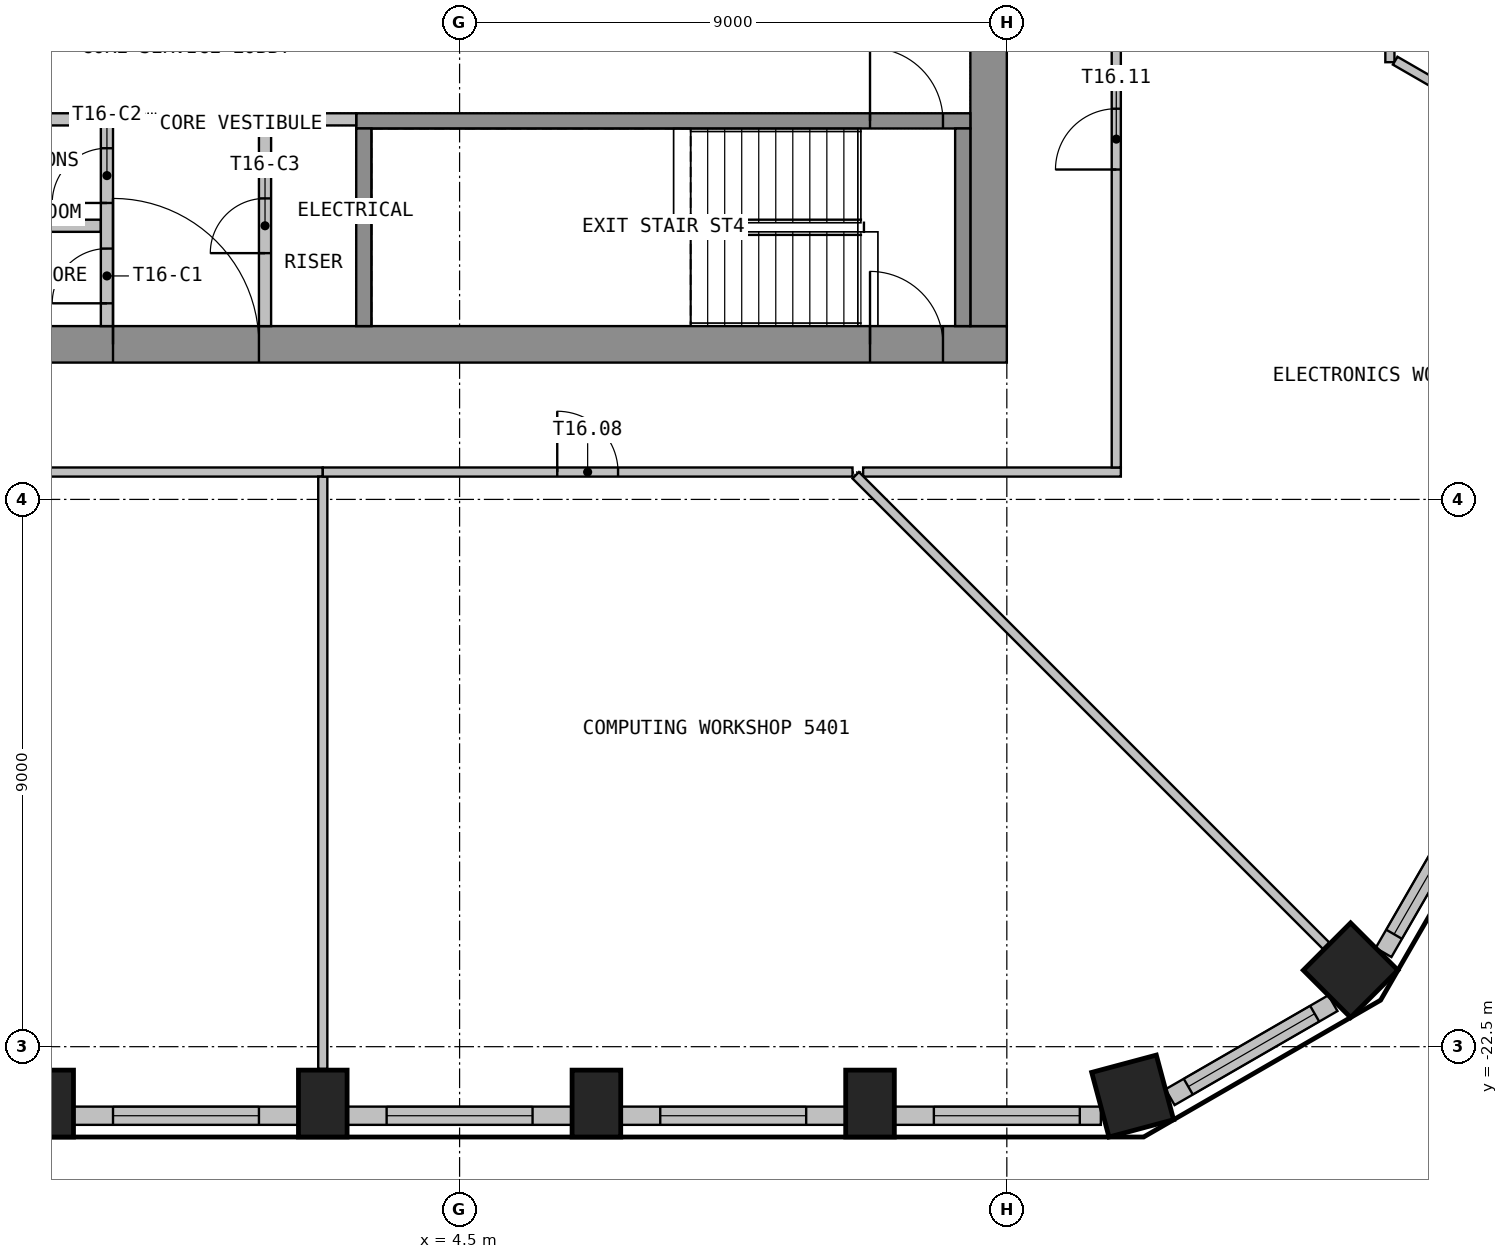
"""IFC4 building model, lengths in metres.
Left out: names, types, materials, properties, quantities, classifications, styles, units other than length and angle.
Written with IfcOpenShell. Run it as: python <this file> out.ifc"""

import sys

from ifc_helpers import new_model, si_unit, direction, frame, frame_2d, origin, origin_2d, place, context, subcontext, project, spatial, rectangle, extrude, element, fill, save


model = new_model("IFC4")
c1 = context("Model", 3, precision=1e-05, world=origin(), true_north=direction((0.0, 1.0)))
c2 = subcontext(c1, "Body", "Model", "MODEL_VIEW")
j1 = project(units=[si_unit("LENGTHUNIT", "METRE"), si_unit("PLANEANGLEUNIT", "RADIAN")], contexts=[c1])
p1 = place(None, origin())
s1 = spatial("IfcSite", under=j1, at=p1, CompositionType="ELEMENT")
p2 = place(p1, origin())
s2 = spatial("IfcBuilding", under=s1, at=p2, CompositionType="ELEMENT")
p3 = place(p2, frame((0.0, 0.0, 219.0)))
s3 = spatial("IfcBuildingStorey", under=s2, at=p3, CompositionType="ELEMENT", Elevation=219.0)
for number, where, z_axis, x_axis in (
    (1, (-2.25, -23.436, 0.0), (0.0, 0.0, 1.0), (1.0, 0.0, 0.0)),
    (2, (2.25, -23.436, 0.0), (0.0, 0.0, 1.0), (1.0, 0.0, 0.0)),
    (3, (6.75, -23.436, 0.0), (0.0, 0.0, 1.0), (1.0, 0.0, 0.0)),
    (4, (11.25, -23.436, 0.0), (0.0, 0.0, 1.0), (1.0, 0.0, 0.0)),
):
    element("IfcColumn", number, at=place(p3, frame(where, z_axis=z_axis, x_axis=x_axis)), inside=s3, PredefinedType="COLUMN", context=c2, shape_type="SweptSolid", body=[
        extrude(rectangle(XDim=0.8, YDim=1.1, at=origin_2d()), origin(), (0.0, 0.0, 1.0), 3.55),
    ])
for number, where, z_axis, x_axis in (
    (5, (15.57, -23.312, 0.0), (0.0, 0.0, 1.0), (0.966, 0.259, 0.0)),
    (6, (19.154, -21.242, 0.0), (0.0, 0.0, 1.0), (0.707, 0.707, 0.0)),
):
    element("IfcColumn", number, at=place(p3, frame(where, z_axis=z_axis, x_axis=x_axis)), inside=s3, PredefinedType="COLUMN", context=c2, shape_type="SweptSolid", body=[
        extrude(rectangle(XDim=1.1, YDim=1.1, at=origin_2d()), origin(), (0.0, 0.0, 1.0), 3.55),
    ])
p4 = place(p3, frame((-1.85, -23.635, 0.0), z_axis=(0.0, 0.0, 1.0), x_axis=(1.0, 0.0, 0.0)))
e7 = element("IfcWall", 7, at=p4, inside=s3, PredefinedType="SOLIDWALL", context=c2, shape_type="SweptSolid", body=[
    extrude(rectangle(XDim=3.699, YDim=0.3, at=frame_2d((1.85, 0.0))), origin(), (0.0, 0.0, 1.0), 3.55),
])
p5 = place(p4, frame((0.649, 0.0, 0.9)))
e8 = element("IfcOpeningElement", 8, at=p5, cuts=e7, PredefinedType="OPENING", context=c2, shape_type="SweptSolid", body=[
    extrude(rectangle(XDim=2.4, YDim=2.1, at=frame_2d((1.2, 1.05))), frame((0.0, 0.16, 0.0), z_axis=(0.0, -1.0, 0.0), x_axis=(1.0, 0.0, 0.0)), (0.0, 0.0, 1.0), 0.32),
])
p6 = place(p3, frame((2.65, -23.635, 0.0), z_axis=(0.0, 0.0, 1.0), x_axis=(1.0, 0.0, 0.0)))
e9 = element("IfcWall", 9, at=p6, inside=s3, PredefinedType="SOLIDWALL", context=c2, shape_type="SweptSolid", body=[
    extrude(rectangle(XDim=3.699, YDim=0.3, at=frame_2d((1.85, 0.0))), origin(), (0.0, 0.0, 1.0), 3.55),
])
p7 = place(p6, frame((0.649, 0.0, 0.9)))
e10 = element("IfcOpeningElement", 10, at=p7, cuts=e9, PredefinedType="OPENING", context=c2, shape_type="SweptSolid", body=[
    extrude(rectangle(XDim=2.4, YDim=2.1, at=frame_2d((1.2, 1.05))), frame((0.0, 0.16, 0.0), z_axis=(0.0, -1.0, 0.0), x_axis=(1.0, 0.0, 0.0)), (0.0, 0.0, 1.0), 0.32),
])
p8 = place(p3, frame((7.15, -23.635, 0.0), z_axis=(0.0, 0.0, 1.0), x_axis=(1.0, 0.0, 0.0)))
e11 = element("IfcWall", 11, at=p8, inside=s3, PredefinedType="SOLIDWALL", context=c2, shape_type="SweptSolid", body=[
    extrude(rectangle(XDim=3.699, YDim=0.3, at=frame_2d((1.85, 0.0))), origin(), (0.0, 0.0, 1.0), 3.55),
])
p9 = place(p8, frame((0.649, 0.0, 0.9)))
e12 = element("IfcOpeningElement", 12, at=p9, cuts=e11, PredefinedType="OPENING", context=c2, shape_type="SweptSolid", body=[
    extrude(rectangle(XDim=2.4, YDim=2.1, at=frame_2d((1.2, 1.05))), frame((0.0, 0.16, 0.0), z_axis=(0.0, -1.0, 0.0), x_axis=(1.0, 0.0, 0.0)), (0.0, 0.0, 1.0), 0.32),
])
p10 = place(p3, frame((11.65, -23.635, 0.0), z_axis=(0.0, 0.0, 1.0), x_axis=(1.0, 0.0, 0.0)))
e13 = element("IfcWall", 13, at=p10, inside=s3, PredefinedType="SOLIDWALL", context=c2, shape_type="SweptSolid", body=[
    extrude(rectangle(XDim=3.396, YDim=0.3, at=frame_2d((1.698, 0.0))), origin(), (0.0, 0.0, 1.0), 3.55),
])
p11 = place(p10, frame((0.649, 0.0, 0.9)))
e14 = element("IfcOpeningElement", 14, at=p11, cuts=e13, PredefinedType="OPENING", context=c2, shape_type="SweptSolid", body=[
    extrude(rectangle(XDim=2.4, YDim=2.1, at=frame_2d((1.2, 1.05))), frame((0.0, 0.16, 0.0), z_axis=(0.0, -1.0, 0.0), x_axis=(1.0, 0.0, 0.0)), (0.0, 0.0, 1.0), 0.32),
])
p12 = place(p3, frame((16.184, -23.331, 0.0), z_axis=(0.0, 0.0, 1.0), x_axis=(0.865994975416, 0.500052699777, 0.0)))
e15 = element("IfcWall", 15, at=p12, inside=s3, PredefinedType="SOLIDWALL", context=c2, shape_type="SweptSolid", body=[
    extrude(rectangle(XDim=3.093, YDim=0.3, at=frame_2d((1.546, 0.0))), origin(), (0.0, 0.0, 1.0), 3.55),
])
p13 = place(p12, frame((0.346, 0.0, 0.9)))
e16 = element("IfcOpeningElement", 16, at=p13, cuts=e15, PredefinedType="OPENING", context=c2, shape_type="SweptSolid", body=[
    extrude(rectangle(XDim=2.4, YDim=2.1, at=frame_2d((1.2, 1.05))), frame((0.0, 0.16, 0.0), z_axis=(0.0, -1.0, 0.0), x_axis=(1.0, 0.0, 0.0)), (0.0, 0.0, 1.0), 0.32),
])
p14 = place(p3, frame((19.696, -20.951, 0.0), z_axis=(0.0, 0.0, 1.0), x_axis=(0.500012868213, 0.866017974191, 0.0)))
e17 = element("IfcWall", 17, at=p14, inside=s3, PredefinedType="SOLIDWALL", context=c2, shape_type="SweptSolid", body=[
    extrude(rectangle(XDim=3.396, YDim=0.3, at=frame_2d((1.698, 0.0))), origin(), (0.0, 0.0, 1.0), 3.55),
])
p15 = place(p14, frame((0.346, 0.0, 0.9)))
e18 = element("IfcOpeningElement", 18, at=p15, cuts=e17, PredefinedType="OPENING", context=c2, shape_type="SweptSolid", body=[
    extrude(rectangle(XDim=2.4, YDim=2.1, at=frame_2d((1.2, 1.05))), frame((0.0, 0.16, 0.0), z_axis=(0.0, -1.0, 0.0), x_axis=(1.0, 0.0, 0.0)), (0.0, 0.0, 1.0), 0.32),
])
p16 = place(p3, frame((-13.5, -10.95, 0.0), z_axis=(0.0, 0.0, 1.0), x_axis=(1.0, 0.0, 0.0)))
e19 = element("IfcWall", 19, at=p16, inside=s3, PredefinedType="SHEAR", context=c2, shape_type="SweptSolid", body=[
    extrude(rectangle(XDim=27.0, YDim=0.6, at=frame_2d((13.5, 0.0))), origin(), (0.0, 0.0, 1.0), 3.55),
])
p17 = place(p16, frame((12.3, 0.0, 0.0)))
e20 = element("IfcOpeningElement", 20, at=p17, cuts=e19, PredefinedType="OPENING", context=c2, shape_type="SweptSolid", body=[
    extrude(rectangle(XDim=2.4, YDim=2.1, at=frame_2d((1.2, 1.05))), frame((0.0, 0.31, 0.0), z_axis=(0.0, -1.0, 0.0), x_axis=(1.0, 0.0, 0.0)), (0.0, 0.0, 1.0), 0.62),
])
p18 = place(p16, frame((1.05, 0.0, 0.0)))
e21 = element("IfcOpeningElement", 21, at=p18, cuts=e19, PredefinedType="OPENING", context=c2, shape_type="SweptSolid", body=[
    extrude(rectangle(XDim=1.2, YDim=2.1, at=frame_2d((0.6, 1.05))), frame((0.0, 0.31, 0.0), z_axis=(0.0, -1.0, 0.0), x_axis=(1.0, 0.0, 0.0)), (0.0, 0.0, 1.0), 0.62),
])
p19 = place(p16, frame((24.75, 0.0, 0.0)))
e22 = element("IfcOpeningElement", 22, at=p19, cuts=e19, PredefinedType="OPENING", context=c2, shape_type="SweptSolid", body=[
    extrude(rectangle(XDim=1.2, YDim=2.1, at=frame_2d((0.6, 1.05))), frame((0.0, 0.31, 0.0), z_axis=(0.0, -1.0, 0.0), x_axis=(1.0, 0.0, 0.0)), (0.0, 0.0, 1.0), 0.62),
])
p20 = place(p3, frame((13.2, -10.65, 0.0), z_axis=(0.0, 0.0, 1.0), x_axis=(0.0, 1.0, 0.0)))
e23 = element("IfcWall", 23, at=p20, inside=s3, PredefinedType="SHEAR", context=c2, shape_type="SweptSolid", body=[
    extrude(rectangle(XDim=21.3, YDim=0.6, at=frame_2d((10.65, 0.0))), origin(), (0.0, 0.0, 1.0), 3.55),
])
p21 = place(p20, frame((9.45, 0.0, 0.0)))
e24 = element("IfcOpeningElement", 24, at=p21, cuts=e23, PredefinedType="OPENING", context=c2, shape_type="SweptSolid", body=[
    extrude(rectangle(XDim=2.4, YDim=2.1, at=frame_2d((1.2, 1.05))), frame((0.0, 0.31, 0.0), z_axis=(0.0, -1.0, 0.0), x_axis=(1.0, 0.0, 0.0)), (0.0, 0.0, 1.0), 0.62),
])
p22 = place(p3, frame((2.8, -7.275, 0.0), z_axis=(0.0, 0.0, 1.0), x_axis=(1.0, 0.0, 0.0)))
e25 = element("IfcWall", 25, at=p22, inside=s3, PredefinedType="SHEAR", context=c2, shape_type="SweptSolid", body=[
    extrude(rectangle(XDim=10.1, YDim=0.25, at=frame_2d((5.05, 0.0))), origin(), (0.0, 0.0, 1.0), 3.55),
])
p23 = place(p22, frame((8.45, 0.0, 0.0)))
e26 = element("IfcOpeningElement", 26, at=p23, cuts=e25, PredefinedType="OPENING", context=c2, shape_type="SweptSolid", body=[
    extrude(rectangle(XDim=1.2, YDim=2.1, at=frame_2d((0.6, 1.05))), frame((0.0, 0.135, 0.0), z_axis=(0.0, -1.0, 0.0), x_axis=(1.0, 0.0, 0.0)), (0.0, 0.0, 1.0), 0.27),
])
for number, where, z_axis, x_axis in (
    (27, (2.925, -10.65, 0.0), (0.0, 0.0, 1.0), (0.0, 1.0, 0.0)),
    (28, (12.775, -10.65, 0.0), (0.0, 0.0, 1.0), (0.0, 1.0, 0.0)),
):
    element("IfcWall", number, at=place(p3, frame(where, z_axis=z_axis, x_axis=x_axis)), inside=s3, PredefinedType="SHEAR", context=c2, shape_type="SweptSolid", body=[
        extrude(rectangle(XDim=3.25, YDim=0.25, at=frame_2d((1.625, 0.0))), origin(), (0.0, 0.0, 1.0), 3.55),
    ])
for number, where, z_axis, x_axis in (
    (29, (-2.8, -7.25, 0.0), (0.0, 0.0, 1.0), (1.0, 0.0, 0.0)),
    (30, (-2.8, -9.0, 0.0), (0.0, 0.0, 1.0), (1.0, 0.0, 0.0)),
    (31, (1.4, -7.25, 0.0), (0.0, 0.0, 1.0), (1.0, 0.0, 0.0)),
):
    element("IfcWall", number, at=place(p3, frame(where, z_axis=z_axis, x_axis=x_axis)), inside=s3, PredefinedType="PARTITIONING", context=c2, shape_type="SweptSolid", body=[
        extrude(rectangle(XDim=1.4, YDim=0.2, at=frame_2d((0.7, 0.0))), origin(), (0.0, 0.0, 1.0), 3.55),
    ])
p24 = place(p3, frame((-1.3, -10.65, 0.0), z_axis=(0.0, 0.0, 1.0), x_axis=(0.0, 1.0, 0.0)))
e32 = element("IfcWall", 32, at=p24, inside=s3, PredefinedType="PARTITIONING", context=c2, shape_type="SweptSolid", body=[
    extrude(rectangle(XDim=3.5, YDim=0.2, at=frame_2d((1.75, 0.0))), origin(), (0.0, 0.0, 1.0), 3.55),
])
p25 = place(p24, frame((0.375, 0.0, 0.0)))
e33 = element("IfcOpeningElement", 33, at=p25, cuts=e32, PredefinedType="OPENING", context=c2, shape_type="SweptSolid", body=[
    extrude(rectangle(XDim=0.9, YDim=2.1, at=frame_2d((0.45, 1.05))), frame((0.0, 0.11, 0.0), z_axis=(0.0, -1.0, 0.0), x_axis=(1.0, 0.0, 0.0)), (0.0, 0.0, 1.0), 0.22),
])
p26 = place(p24, frame((2.025, 0.0, 0.0)))
e34 = element("IfcOpeningElement", 34, at=p26, cuts=e32, PredefinedType="OPENING", context=c2, shape_type="SweptSolid", body=[
    extrude(rectangle(XDim=0.9, YDim=2.1, at=frame_2d((0.45, 1.05))), frame((0.0, 0.11, 0.0), z_axis=(0.0, -1.0, 0.0), x_axis=(1.0, 0.0, 0.0)), (0.0, 0.0, 1.0), 0.22),
])
p27 = place(p3, frame((1.3, -10.65, 0.0), z_axis=(0.0, 0.0, 1.0), x_axis=(0.0, 1.0, 0.0)))
e35 = element("IfcWall", 35, at=p27, inside=s3, PredefinedType="PARTITIONING", context=c2, shape_type="SweptSolid", body=[
    extrude(rectangle(XDim=3.5, YDim=0.2, at=frame_2d((1.75, 0.0))), origin(), (0.0, 0.0, 1.0), 3.55),
])
p28 = place(p27, frame((1.2, 0.0, 0.0)))
e36 = element("IfcOpeningElement", 36, at=p28, cuts=e35, PredefinedType="OPENING", context=c2, shape_type="SweptSolid", body=[
    extrude(rectangle(XDim=0.9, YDim=2.1, at=frame_2d((0.45, 1.05))), frame((0.0, 0.11, 0.0), z_axis=(0.0, -1.0, 0.0), x_axis=(1.0, 0.0, 0.0)), (0.0, 0.0, 1.0), 0.22),
])
p29 = place(p3, frame((-13.603, -13.05, 0.0), z_axis=(0.0, 0.0, 1.0), x_axis=(1.0, 0.0, 0.0)))
e37 = element("IfcWall", 37, at=p29, inside=s3, PredefinedType="PARTITIONING", context=c2, shape_type="SweptSolid", body=[
    extrude(rectangle(XDim=15.853, YDim=0.15, at=frame_2d((7.927, 0.0))), origin(), (0.0, 0.0, 1.0), 3.55),
])
p30 = place(p29, frame((7.427, 0.0, 0.0)))
e38 = element("IfcOpeningElement", 38, at=p30, cuts=e37, PredefinedType="OPENING", context=c2, shape_type="SweptSolid", body=[
    extrude(rectangle(XDim=1.0, YDim=2.1, at=frame_2d((0.5, 1.05))), frame((0.0, 0.085, 0.0), z_axis=(0.0, -1.0, 0.0), x_axis=(1.0, 0.0, 0.0)), (0.0, 0.0, 1.0), 0.17),
])
p31 = place(p3, frame((2.25, -13.125, 0.0), z_axis=(0.0, 0.0, 1.0), x_axis=(0.0, -1.0, 0.0)))
e39 = element("IfcWall", 39, at=p31, inside=s3, PredefinedType="PARTITIONING", context=c2, shape_type="SweptSolid", body=[
    extrude(rectangle(XDim=9.74, YDim=0.15, at=frame_2d((4.87, 0.0))), origin(), (0.0, 0.0, 1.0), 3.55),
])
p32 = place(p3, frame((2.25, -13.05, 0.0), z_axis=(0.0, 0.0, 1.0), x_axis=(1.0, 0.0, 0.0)))
e40 = element("IfcWall", 40, at=p32, inside=s3, PredefinedType="PARTITIONING", context=c2, shape_type="SweptSolid", body=[
    extrude(rectangle(XDim=8.712, YDim=0.15, at=frame_2d((4.356, 0.0))), origin(), (0.0, 0.0, 1.0), 3.55),
])
p33 = place(p32, frame((3.856, 0.0, 0.0)))
e41 = element("IfcOpeningElement", 41, at=p33, cuts=e40, PredefinedType="OPENING", context=c2, shape_type="SweptSolid", body=[
    extrude(rectangle(XDim=1.0, YDim=2.1, at=frame_2d((0.5, 1.05))), frame((0.0, 0.085, 0.0), z_axis=(0.0, -1.0, 0.0), x_axis=(1.0, 0.0, 0.0)), (0.0, 0.0, 1.0), 0.17),
])
p34 = place(p3, frame((11.137, -13.05, 0.0), z_axis=(0.0, 0.0, 1.0), x_axis=(1.0, 0.0, 0.0)))
e42 = element("IfcWall", 42, at=p34, inside=s3, PredefinedType="PARTITIONING", context=c2, shape_type="SweptSolid", body=[
    extrude(rectangle(XDim=4.238, YDim=0.15, at=frame_2d((2.119, 0.0))), origin(), (0.0, 0.0, 1.0), 3.55),
])
p35 = place(p3, frame((11.015, -13.103, 0.0), z_axis=(0.0, 0.0, 1.0), x_axis=(0.707073307884, -0.707140252905, 0.0)))
e43 = element("IfcWall", 43, at=p35, inside=s3, PredefinedType="PARTITIONING", context=c2, shape_type="SweptSolid", body=[
    extrude(rectangle(XDim=10.941, YDim=0.15, at=frame_2d((5.47, 0.0))), origin(), (0.0, 0.0, 1.0), 3.55),
])
p36 = place(p3, frame((15.3, -12.975, 0.0), z_axis=(0.0, 0.0, 1.0), x_axis=(0.0, 1.0, 0.0)))
e44 = element("IfcWall", 44, at=p36, inside=s3, PredefinedType="PARTITIONING", context=c2, shape_type="SweptSolid", body=[
    extrude(rectangle(XDim=10.8, YDim=0.15, at=frame_2d((5.4, 0.0))), origin(), (0.0, 0.0, 1.0), 3.55),
])
p37 = place(p36, frame((4.9, 0.0, 0.0)))
e45 = element("IfcOpeningElement", 45, at=p37, cuts=e44, PredefinedType="OPENING", context=c2, shape_type="SweptSolid", body=[
    extrude(rectangle(XDim=1.0, YDim=2.1, at=frame_2d((0.5, 1.05))), frame((0.0, 0.085, 0.0), z_axis=(0.0, -1.0, 0.0), x_axis=(1.0, 0.0, 0.0)), (0.0, 0.0, 1.0), 0.17),
])
p38 = place(p3, frame((19.8, -2.325, 0.0), z_axis=(0.0, 0.0, 1.0), x_axis=(0.0, -1.0, 0.0)))
e46 = element("IfcWall", 46, at=p38, inside=s3, PredefinedType="PARTITIONING", context=c2, shape_type="SweptSolid", body=[
    extrude(rectangle(XDim=3.985, YDim=0.15, at=frame_2d((1.993, 0.0))), origin(), (0.0, 0.0, 1.0), 3.55),
])
p39 = place(p3, frame((19.887, -6.285, 0.0), z_axis=(0.0, 0.0, 1.0), x_axis=(0.865981426562, -0.500076163049, 0.0)))
e47 = element("IfcWall", 47, at=p39, inside=s3, PredefinedType="PARTITIONING", context=c2, shape_type="SweptSolid", body=[
    extrude(rectangle(XDim=2.888, YDim=0.15, at=frame_2d((1.444, 0.0))), origin(), (0.0, 0.0, 1.0), 3.55),
])
p40 = place(p5, origin())
e48 = element("IfcWindow", 48, at=p40, inside=s3, PartitioningType="SINGLE_PANEL", PredefinedType="WINDOW", context=c2, shape_type="SweptSolid", body=[
    extrude(rectangle(XDim=2.4, YDim=2.1, at=frame_2d((1.2, 1.05))), frame((0.0, 0.03, 0.0), z_axis=(0.0, -1.0, 0.0), x_axis=(1.0, 0.0, 0.0)), (0.0, 0.0, 1.0), 0.06),
])
fill(e8, e48)
p41 = place(p7, origin())
e49 = element("IfcWindow", 49, at=p41, inside=s3, PartitioningType="SINGLE_PANEL", PredefinedType="WINDOW", context=c2, shape_type="SweptSolid", body=[
    extrude(rectangle(XDim=2.4, YDim=2.1, at=frame_2d((1.2, 1.05))), frame((0.0, 0.03, 0.0), z_axis=(0.0, -1.0, 0.0), x_axis=(1.0, 0.0, 0.0)), (0.0, 0.0, 1.0), 0.06),
])
fill(e10, e49)
p42 = place(p9, origin())
e50 = element("IfcWindow", 50, at=p42, inside=s3, PartitioningType="SINGLE_PANEL", PredefinedType="WINDOW", context=c2, shape_type="SweptSolid", body=[
    extrude(rectangle(XDim=2.4, YDim=2.1, at=frame_2d((1.2, 1.05))), frame((0.0, 0.03, 0.0), z_axis=(0.0, -1.0, 0.0), x_axis=(1.0, 0.0, 0.0)), (0.0, 0.0, 1.0), 0.06),
])
fill(e12, e50)
p43 = place(p11, origin())
e51 = element("IfcWindow", 51, at=p43, inside=s3, PartitioningType="SINGLE_PANEL", PredefinedType="WINDOW", context=c2, shape_type="SweptSolid", body=[
    extrude(rectangle(XDim=2.4, YDim=2.1, at=frame_2d((1.2, 1.05))), frame((0.0, 0.03, 0.0), z_axis=(0.0, -1.0, 0.0), x_axis=(1.0, 0.0, 0.0)), (0.0, 0.0, 1.0), 0.06),
])
fill(e14, e51)
p44 = place(p13, origin())
e52 = element("IfcWindow", 52, at=p44, inside=s3, PartitioningType="SINGLE_PANEL", PredefinedType="WINDOW", context=c2, shape_type="SweptSolid", body=[
    extrude(rectangle(XDim=2.4, YDim=2.1, at=frame_2d((1.2, 1.05))), frame((0.0, 0.03, 0.0), z_axis=(0.0, -1.0, 0.0), x_axis=(1.0, 0.0, 0.0)), (0.0, 0.0, 1.0), 0.06),
])
fill(e16, e52)
p45 = place(p15, origin())
e53 = element("IfcWindow", 53, at=p45, inside=s3, PartitioningType="SINGLE_PANEL", PredefinedType="WINDOW", context=c2, shape_type="SweptSolid", body=[
    extrude(rectangle(XDim=2.4, YDim=2.1, at=frame_2d((1.2, 1.05))), frame((0.0, 0.03, 0.0), z_axis=(0.0, -1.0, 0.0), x_axis=(1.0, 0.0, 0.0)), (0.0, 0.0, 1.0), 0.06),
])
fill(e18, e53)
p46 = place(p17, origin())
e54 = element("IfcDoor", 54, at=p46, inside=s3, OperationType="DOUBLE_DOOR_DOUBLE_SWING", PredefinedType="DOOR", context=c2, shape_type="SweptSolid", body=[
    extrude(rectangle(XDim=2.4, YDim=2.1, at=frame_2d((1.2, 1.05))), frame((0.0, 0.025, 0.0), z_axis=(0.0, -1.0, 0.0), x_axis=(1.0, 0.0, 0.0)), (0.0, 0.0, 1.0), 0.05),
])
fill(e20, e54)
p47 = place(p19, origin())
e55 = element("IfcDoor", 55, at=p47, inside=s3, OperationType="SINGLE_SWING_RIGHT", PredefinedType="DOOR", context=c2, shape_type="SweptSolid", body=[
    extrude(rectangle(XDim=1.2, YDim=2.1, at=frame_2d((0.6, 1.05))), frame((0.0, 0.025, 0.0), z_axis=(0.0, -1.0, 0.0), x_axis=(1.0, 0.0, 0.0)), (0.0, 0.0, 1.0), 0.05),
])
fill(e22, e55)
p48 = place(p23, origin())
e56 = element("IfcDoor", 56, at=p48, inside=s3, OperationType="SINGLE_SWING_LEFT", PredefinedType="DOOR", context=c2, shape_type="SweptSolid", body=[
    extrude(rectangle(XDim=1.2, YDim=2.1, at=frame_2d((0.6, 1.05))), frame((0.0, 0.025, 0.0), z_axis=(0.0, -1.0, 0.0), x_axis=(1.0, 0.0, 0.0)), (0.0, 0.0, 1.0), 0.05),
])
fill(e26, e56)
p49 = place(p25, origin())
e57 = element("IfcDoor", 57, at=p49, inside=s3, OperationType="SINGLE_SWING_LEFT", PredefinedType="DOOR", context=c2, shape_type="SweptSolid", body=[
    extrude(rectangle(XDim=0.9, YDim=2.1, at=frame_2d((0.45, 1.05))), frame((0.0, 0.025, 0.0), z_axis=(0.0, -1.0, 0.0), x_axis=(1.0, 0.0, 0.0)), (0.0, 0.0, 1.0), 0.05),
])
fill(e33, e57)
p50 = place(p26, origin())
e58 = element("IfcDoor", 58, at=p50, inside=s3, OperationType="SINGLE_SWING_LEFT", PredefinedType="DOOR", context=c2, shape_type="SweptSolid", body=[
    extrude(rectangle(XDim=0.9, YDim=2.1, at=frame_2d((0.45, 1.05))), frame((0.0, 0.025, 0.0), z_axis=(0.0, -1.0, 0.0), x_axis=(1.0, 0.0, 0.0)), (0.0, 0.0, 1.0), 0.05),
])
fill(e34, e58)
p51 = place(p28, origin())
e59 = element("IfcDoor", 59, at=p51, inside=s3, OperationType="SINGLE_SWING_LEFT", PredefinedType="DOOR", context=c2, shape_type="SweptSolid", body=[
    extrude(rectangle(XDim=0.9, YDim=2.1, at=frame_2d((0.45, 1.05))), frame((0.0, 0.025, 0.0), z_axis=(0.0, -1.0, 0.0), x_axis=(1.0, 0.0, 0.0)), (0.0, 0.0, 1.0), 0.05),
])
fill(e36, e59)
p52 = place(p33, origin())
e60 = element("IfcDoor", 60, at=p52, inside=s3, OperationType="SINGLE_SWING_RIGHT", PredefinedType="DOOR", context=c2, shape_type="SweptSolid", body=[
    extrude(rectangle(XDim=1.0, YDim=2.1, at=frame_2d((0.5, 1.05))), frame((0.0, 0.025, 0.0), z_axis=(0.0, -1.0, 0.0), x_axis=(1.0, 0.0, 0.0)), (0.0, 0.0, 1.0), 0.05),
])
fill(e41, e60)
p53 = place(p37, origin())
e61 = element("IfcDoor", 61, at=p53, inside=s3, OperationType="SINGLE_SWING_RIGHT", PredefinedType="DOOR", context=c2, shape_type="SweptSolid", body=[
    extrude(rectangle(XDim=1.0, YDim=2.1, at=frame_2d((0.5, 1.05))), frame((0.0, 0.025, 0.0), z_axis=(0.0, -1.0, 0.0), x_axis=(1.0, 0.0, 0.0)), (0.0, 0.0, 1.0), 0.05),
])
fill(e45, e61)
save(model, sys.argv[1])
